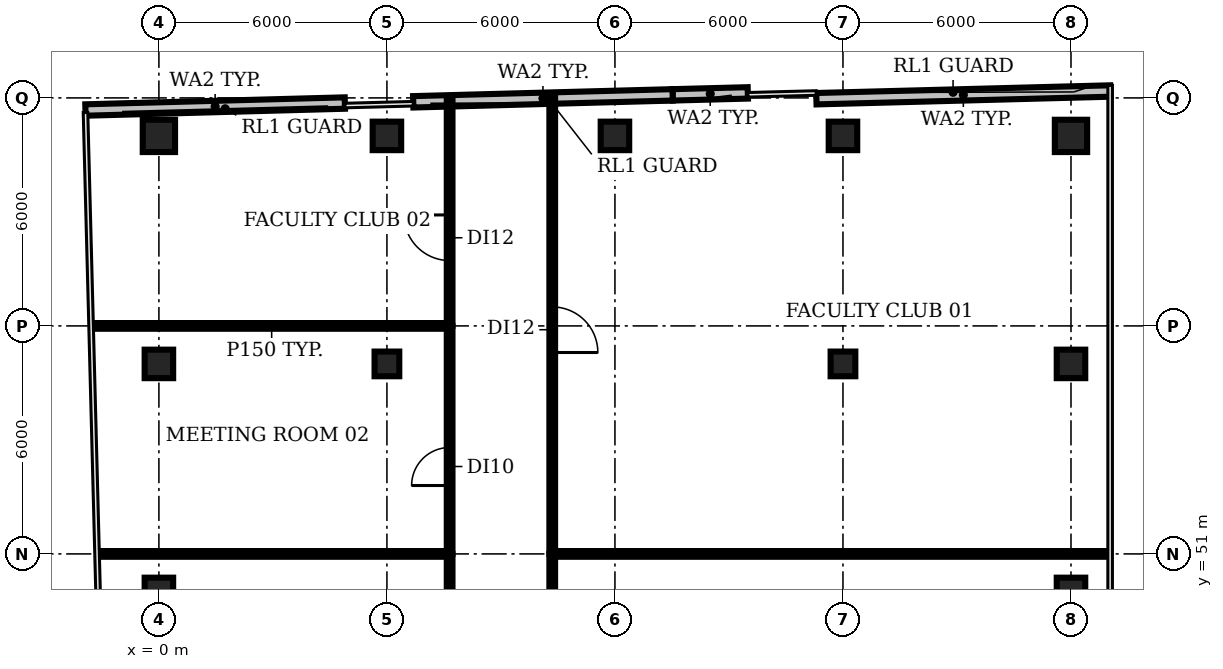
"""IFC4 building model, lengths in metres.
Left out: names, types, materials, properties, quantities, classifications, styles, units other than length and angle.
Written with IfcOpenShell. Run it as: python <this file> out.ifc"""

import sys

from ifc_helpers import new_model, si_unit, direction, frame, frame_2d, origin, origin_2d, place, context, subcontext, project, spatial, rectangle, circle, extrude, element, fill, save


model = new_model("IFC4")
c1 = context("Model", 3, precision=1e-05, world=origin(), true_north=direction((0.0, 1.0)))
c2 = subcontext(c1, "Body", "Model", "MODEL_VIEW")
j1 = project(units=[si_unit("LENGTHUNIT", "METRE"), si_unit("PLANEANGLEUNIT", "RADIAN")], contexts=[c1])
p1 = place(None, origin())
s1 = spatial("IfcSite", under=j1, at=p1, CompositionType="ELEMENT")
p2 = place(p1, origin())
s2 = spatial("IfcBuilding", under=s1, at=p2, CompositionType="ELEMENT")
p3 = place(p2, frame((0.0, 0.0, 293.6)))
s3 = spatial("IfcBuildingStorey", under=s2, at=p3, CompositionType="ELEMENT", Elevation=293.6)
for number, where, z_axis, x_axis in (
    (1, (0.0, 50.0, 0.0), (0.0, 0.0, 1.0), (1.0, 0.0, 0.0)),
    (2, (0.0, 56.0, 0.0), (0.0, 0.0, 1.0), (1.0, 0.0, 0.0)),
):
    element("IfcColumn", number, at=place(p3, frame(where, z_axis=z_axis, x_axis=x_axis)), inside=s3, PredefinedType="COLUMN", context=c2, shape_type="SweptSolid", body=[
        extrude(rectangle(XDim=0.75, YDim=0.75, at=origin_2d()), origin(), (0.0, 0.0, 1.0), 3.85),
    ])
p4 = place(p3, frame((0.0, 62.0, 0.0), z_axis=(0.0, 0.0, 1.0), x_axis=(1.0, 0.0, 0.0)))
e3 = element("IfcColumn", 3, at=p4, inside=s3, PredefinedType="COLUMN", context=c2, shape_type="SweptSolid", body=[
    extrude(circle(Radius=0.425, at=origin_2d()), origin(), (0.0, 0.0, 1.0), 3.85),
])
p5 = place(p3, frame((6.0, 56.0, 0.0), z_axis=(0.0, 0.0, 1.0), x_axis=(1.0, 0.0, 0.0)))
e4 = element("IfcColumn", 4, at=p5, inside=s3, PredefinedType="COLUMN", context=c2, shape_type="SweptSolid", body=[
    extrude(rectangle(XDim=0.65, YDim=0.65, at=origin_2d()), origin(), (0.0, 0.0, 1.0), 3.85),
])
for number, where, z_axis, x_axis in (
    (5, (6.0, 62.0, 0.0), (0.0, 0.0, 1.0), (1.0, 0.0, 0.0)),
    (6, (12.0, 62.0, 0.0), (0.0, 0.0, 1.0), (1.0, 0.0, 0.0)),
):
    element("IfcColumn", number, at=place(p3, frame(where, z_axis=z_axis, x_axis=x_axis)), inside=s3, PredefinedType="COLUMN", context=c2, shape_type="SweptSolid", body=[
        extrude(rectangle(XDim=0.75, YDim=0.75, at=origin_2d()), origin(), (0.0, 0.0, 1.0), 3.85),
    ])
p6 = place(p3, frame((18.0, 56.0, 0.0), z_axis=(0.0, 0.0, 1.0), x_axis=(1.0, 0.0, 0.0)))
e7 = element("IfcColumn", 7, at=p6, inside=s3, PredefinedType="COLUMN", context=c2, shape_type="SweptSolid", body=[
    extrude(rectangle(XDim=0.65, YDim=0.65, at=origin_2d()), origin(), (0.0, 0.0, 1.0), 3.85),
])
for number, where, z_axis, x_axis in (
    (8, (18.0, 62.0, 0.0), (0.0, 0.0, 1.0), (1.0, 0.0, 0.0)),
    (9, (24.0, 50.0, 0.0), (0.0, 0.0, 1.0), (1.0, 0.0, 0.0)),
    (10, (24.0, 56.0, 0.0), (0.0, 0.0, 1.0), (1.0, 0.0, 0.0)),
):
    element("IfcColumn", number, at=place(p3, frame(where, z_axis=z_axis, x_axis=x_axis)), inside=s3, PredefinedType="COLUMN", context=c2, shape_type="SweptSolid", body=[
        extrude(rectangle(XDim=0.75, YDim=0.75, at=origin_2d()), origin(), (0.0, 0.0, 1.0), 3.85),
    ])
p7 = place(p3, frame((24.0, 62.0, 0.0), z_axis=(0.0, 0.0, 1.0), x_axis=(1.0, 0.0, 0.0)))
e11 = element("IfcColumn", 11, at=p7, inside=s3, PredefinedType="COLUMN", context=c2, shape_type="SweptSolid", body=[
    extrude(circle(Radius=0.425, at=origin_2d()), origin(), (0.0, 0.0, 1.0), 3.85),
])
p8 = place(p3, frame((25.034, 63.181, 0.0), z_axis=(0.0, 0.0, 1.0), x_axis=(-0.999657687485, -0.026163100961, 0.0)))
e12 = element("IfcWall", 12, at=p8, inside=s3, PredefinedType="SOLIDWALL", context=c2, shape_type="SweptSolid", body=[
    extrude(rectangle(XDim=7.736, YDim=0.3, at=frame_2d((3.868, 0.0))), origin(), (0.0, 0.0, 1.0), 3.85),
])
p9 = place(p3, frame((15.496, 63.132, 0.0), z_axis=(0.0, 0.0, 1.0), x_axis=(-0.999657751572, -0.026160652183, 0.0)))
e13 = element("IfcWall", 13, at=p9, inside=s3, PredefinedType="SOLIDWALL", context=c2, shape_type="SweptSolid", body=[
    extrude(rectangle(XDim=1.979, YDim=0.3, at=frame_2d((0.989, 0.0))), origin(), (0.0, 0.0, 1.0), 3.85),
])
p10 = place(p3, frame((13.518, 63.08, 0.0), z_axis=(0.0, 0.0, 1.0), x_axis=(-0.999640403912, -0.026815347578, 0.0)))
e14 = element("IfcWall", 14, at=p10, inside=s3, PredefinedType="SOLIDWALL", context=c2, shape_type="SweptSolid", body=[
    extrude(rectangle(XDim=6.828, YDim=0.3, at=frame_2d((3.414, 0.0))), origin(), (0.0, 0.0, 1.0), 3.85),
])
p11 = place(p3, frame((4.893, 62.865, 0.0), z_axis=(0.0, 0.0, 1.0), x_axis=(-0.99963941909, -0.026852035329, 0.0)))
e15 = element("IfcWall", 15, at=p11, inside=s3, PredefinedType="SOLIDWALL", context=c2, shape_type="SweptSolid", body=[
    extrude(rectangle(XDim=6.828, YDim=0.3, at=frame_2d((3.414, 0.0))), origin(), (0.0, 0.0, 1.0), 3.85),
])
p12 = place(p3, frame((-1.716, 57.0, 0.0), z_axis=(0.0, 0.0, 1.0), x_axis=(1.0, 0.0, 0.0)))
e16 = element("IfcWall", 16, at=p12, inside=s3, PredefinedType="PARTITIONING", context=c2, shape_type="SweptSolid", body=[
    extrude(rectangle(XDim=9.366, YDim=0.15, at=frame_2d((4.683, 0.0))), origin(), (0.0, 0.0, 1.0), 2.9),
])
p13 = place(p3, frame((-1.566, 51.0, 0.0), z_axis=(0.0, 0.0, 1.0), x_axis=(1.0, 0.0, 0.0)))
e17 = element("IfcWall", 17, at=p13, inside=s3, PredefinedType="PARTITIONING", context=c2, shape_type="SweptSolid", body=[
    extrude(rectangle(XDim=9.216, YDim=0.15, at=frame_2d((4.608, 0.0))), origin(), (0.0, 0.0, 1.0), 2.9),
])
p14 = place(p3, frame((7.65, 39.0, 0.0), z_axis=(0.0, 0.0, 1.0), x_axis=(0.0, 1.0, 0.0)))
e18 = element("IfcWall", 18, at=p14, inside=s3, PredefinedType="PARTITIONING", context=c2, shape_type="SweptSolid", body=[
    extrude(rectangle(XDim=12.0, YDim=0.15, at=frame_2d((6.0, 0.0))), origin(), (0.0, 0.0, 1.0), 2.9),
])
p15 = place(p14, frame((7.0, 0.0, 0.0)))
e19 = element("IfcOpeningElement", 19, at=p15, cuts=e18, PredefinedType="OPENING", context=c2, shape_type="SweptSolid", body=[
    extrude(rectangle(XDim=1.2, YDim=2.1, at=frame_2d((0.6, 1.05))), frame((0.0, 0.085, 0.0), z_axis=(0.0, -1.0, 0.0), x_axis=(1.0, 0.0, 0.0)), (0.0, 0.0, 1.0), 0.17),
])
p16 = place(p3, frame((7.65, 51.0, 0.0), z_axis=(0.0, 0.0, 1.0), x_axis=(0.0, 1.0, 0.0)))
e20 = element("IfcWall", 20, at=p16, inside=s3, PredefinedType="PARTITIONING", context=c2, shape_type="SweptSolid", body=[
    extrude(rectangle(XDim=6.0, YDim=0.15, at=frame_2d((3.0, 0.0))), origin(), (0.0, 0.0, 1.0), 2.9),
])
p17 = place(p16, frame((1.8, 0.0, 0.0)))
e21 = element("IfcOpeningElement", 21, at=p17, cuts=e20, PredefinedType="OPENING", context=c2, shape_type="SweptSolid", body=[
    extrude(rectangle(XDim=1.0, YDim=2.1, at=frame_2d((0.5, 1.05))), frame((0.0, 0.085, 0.0), z_axis=(0.0, -1.0, 0.0), x_axis=(1.0, 0.0, 0.0)), (0.0, 0.0, 1.0), 0.17),
])
p18 = place(p3, frame((7.65, 57.0, 0.0), z_axis=(0.0, 0.0, 1.0), x_axis=(0.0, 1.0, 0.0)))
e22 = element("IfcWall", 22, at=p18, inside=s3, PredefinedType="PARTITIONING", context=c2, shape_type="SweptSolid", body=[
    extrude(rectangle(XDim=5.933, YDim=0.15, at=frame_2d((2.966, 0.0))), origin(), (0.0, 0.0, 1.0), 2.9),
])
p19 = place(p18, frame((1.72, 0.0, 0.0)))
e23 = element("IfcOpeningElement", 23, at=p19, cuts=e22, PredefinedType="OPENING", context=c2, shape_type="SweptSolid", body=[
    extrude(rectangle(XDim=1.2, YDim=2.1, at=frame_2d((0.6, 1.05))), frame((0.0, 0.085, 0.0), z_axis=(0.0, -1.0, 0.0), x_axis=(1.0, 0.0, 0.0)), (0.0, 0.0, 1.0), 0.17),
])
p20 = place(p3, frame((10.35, 51.0, 0.0), z_axis=(0.0, 0.0, 1.0), x_axis=(0.0, -1.0, 0.0)))
e24 = element("IfcWall", 24, at=p20, inside=s3, PredefinedType="PARTITIONING", context=c2, shape_type="SweptSolid", body=[
    extrude(rectangle(XDim=6.0, YDim=0.15, at=frame_2d((3.0, 0.0))), origin(), (0.0, 0.0, 1.0), 2.9),
])
p21 = place(p20, frame((2.4, 0.0, 0.0)))
e25 = element("IfcOpeningElement", 25, at=p21, cuts=e24, PredefinedType="OPENING", context=c2, shape_type="SweptSolid", body=[
    extrude(rectangle(XDim=1.0, YDim=2.1, at=frame_2d((0.5, 1.05))), frame((0.0, 0.085, 0.0), z_axis=(0.0, -1.0, 0.0), x_axis=(1.0, 0.0, 0.0)), (0.0, 0.0, 1.0), 0.17),
])
p22 = place(p3, frame((10.35, 51.0, 0.0), z_axis=(0.0, 0.0, 1.0), x_axis=(1.0, 0.0, 0.0)))
e26 = element("IfcWall", 26, at=p22, inside=s3, PredefinedType="PARTITIONING", context=c2, shape_type="SweptSolid", body=[
    extrude(rectangle(XDim=14.63, YDim=0.15, at=frame_2d((7.315, 0.0))), origin(), (0.0, 0.0, 1.0), 2.9),
])
p23 = place(p3, frame((10.35, 63.005, 0.0), z_axis=(0.0, 0.0, 1.0), x_axis=(0.0, -1.0, 0.0)))
e27 = element("IfcWall", 27, at=p23, inside=s3, PredefinedType="PARTITIONING", context=c2, shape_type="SweptSolid", body=[
    extrude(rectangle(XDim=12.005, YDim=0.15, at=frame_2d((6.002, 0.0))), origin(), (0.0, 0.0, 1.0), 2.9),
])
p24 = place(p23, frame((5.505, 0.0, 0.0)))
e28 = element("IfcOpeningElement", 28, at=p24, cuts=e27, PredefinedType="OPENING", context=c2, shape_type="SweptSolid", body=[
    extrude(rectangle(XDim=1.2, YDim=2.1, at=frame_2d((0.6, 1.05))), frame((0.0, 0.085, 0.0), z_axis=(0.0, -1.0, 0.0), x_axis=(1.0, 0.0, 0.0)), (0.0, 0.0, 1.0), 0.17),
])
p25 = place(p17, origin())
e29 = element("IfcDoor", 29, at=p25, inside=s3, OperationType="SINGLE_SWING_LEFT", PredefinedType="DOOR", context=c2, shape_type="SweptSolid", body=[
    extrude(rectangle(XDim=1.0, YDim=2.1, at=frame_2d((0.5, 1.05))), frame((0.0, 0.025, 0.0), z_axis=(0.0, -1.0, 0.0), x_axis=(1.0, 0.0, 0.0)), (0.0, 0.0, 1.0), 0.05),
])
fill(e21, e29)
p26 = place(p19, origin())
e30 = element("IfcDoor", 30, at=p26, inside=s3, OperationType="SINGLE_SWING_RIGHT", PredefinedType="DOOR", context=c2, shape_type="SweptSolid", body=[
    extrude(rectangle(XDim=1.2, YDim=2.1, at=frame_2d((0.6, 1.05))), frame((0.0, 0.025, 0.0), z_axis=(0.0, -1.0, 0.0), x_axis=(1.0, 0.0, 0.0)), (0.0, 0.0, 1.0), 0.05),
])
fill(e23, e30)
p27 = place(p24, origin())
e31 = element("IfcDoor", 31, at=p27, inside=s3, OperationType="SINGLE_SWING_RIGHT", PredefinedType="DOOR", context=c2, shape_type="SweptSolid", body=[
    extrude(rectangle(XDim=1.2, YDim=2.1, at=frame_2d((0.6, 1.05))), frame((0.0, 0.025, 0.0), z_axis=(0.0, -1.0, 0.0), x_axis=(1.0, 0.0, 0.0)), (0.0, 0.0, 1.0), 0.05),
])
fill(e28, e31)
save(model, sys.argv[1])
